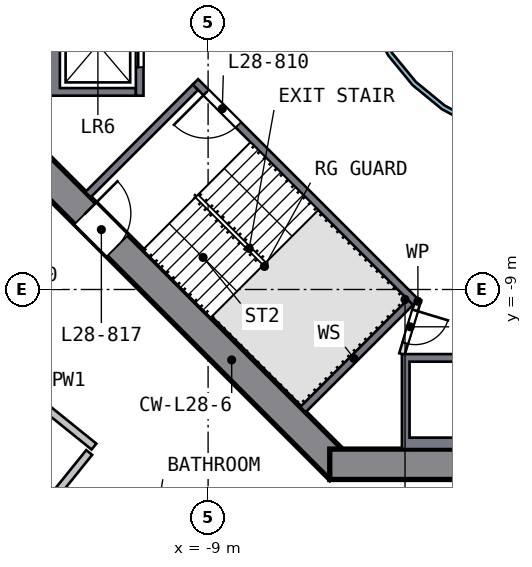
"""IFC4 building model, lengths in metres.
Left out: names, types, materials, properties, quantities, classifications, styles, units other than length and angle.
Written with IfcOpenShell. Run it as: python <this file> out.ifc"""

import sys

from ifc_helpers import new_model, si_unit, direction, frame, frame_2d, origin, place, context, subcontext, project, spatial, polyline, rectangle, outline, extrude, element, fill, save


model = new_model("IFC4")
c1 = context("Model", 3, precision=1e-05, world=origin(), true_north=direction((0.0, 1.0)))
c2 = subcontext(c1, "Body", "Model", "MODEL_VIEW")
j1 = project(units=[si_unit("LENGTHUNIT", "METRE"), si_unit("PLANEANGLEUNIT", "RADIAN")], contexts=[c1])
p1 = place(None, origin())
s1 = spatial("IfcSite", under=j1, at=p1, CompositionType="ELEMENT")
p2 = place(p1, origin())
s2 = spatial("IfcBuilding", under=s1, at=p2, CompositionType="ELEMENT")
p3 = place(p2, frame((0.0, 0.0, 118.5)))
s3 = spatial("IfcBuildingStorey", under=s2, at=p3, CompositionType="ELEMENT", Elevation=118.5)
p4 = place(p3, frame((-13.717, -5.516, 0.0), z_axis=(0.0, 0.0, 1.0), x_axis=(0.707106781, -0.707106781, 0.0)))
e1 = element("IfcWall", 1, at=p4, inside=s3, PredefinedType="SHEAR", context=c2, shape_type="SweptSolid", body=[
    extrude(rectangle(XDim=11.598, YDim=0.8, at=frame_2d((5.799, 0.0))), origin(), (0.0, 0.0, 1.0), 3.5),
])
p5 = place(p4, frame((2.099, 0.0, 0.0)))
e2 = element("IfcOpeningElement", 2, at=p5, cuts=e1, PredefinedType="OPENING", context=c2, shape_type="SweptSolid", body=[
    extrude(rectangle(XDim=1.2, YDim=2.1, at=frame_2d((0.6, 1.05))), frame((0.0, 0.41, 0.0), z_axis=(0.0, -1.0, 0.0), x_axis=(1.0, 0.0, 0.0)), (0.0, 0.0, 1.0), 0.82),
])
p6 = place(p3, frame((-5.799, -13.6, 0.0), z_axis=(0.0, 0.0, 1.0), x_axis=(1.0, 0.0, 0.0)))
e3 = element("IfcWall", 3, at=p6, inside=s3, PredefinedType="SHEAR", context=c2, shape_type="SweptSolid", body=[
    extrude(rectangle(XDim=11.598, YDim=0.8, at=frame_2d((5.799, 0.0))), origin(), (0.0, 0.0, 1.0), 3.5),
])
p7 = place(p6, frame((4.899, 0.0, 0.0)))
e4 = element("IfcOpeningElement", 4, at=p7, cuts=e3, PredefinedType="OPENING", context=c2, shape_type="SweptSolid", body=[
    extrude(rectangle(XDim=1.8, YDim=2.1, at=frame_2d((0.9, 1.05))), frame((0.0, 0.41, 0.0), z_axis=(0.0, -1.0, 0.0), x_axis=(1.0, 0.0, 0.0)), (0.0, 0.0, 1.0), 0.82),
])
p8 = place(p3, origin())
e5 = element("IfcWall", 5, at=p8, inside=s3, PredefinedType="SOLIDWALL", context=c2, shape_type="SweptSolid", body=[
    extrude(outline(polyline([(-13.2, -3.9), (-13.2, -1.2), (-10.9, -1.2), (-10.9, -1.4), (-12.9, -1.4), (-12.9, -3.7), (-10.9, -3.7), (-10.9, -3.9), (-13.2, -3.9)])), origin(), (0.0, 0.0, 1.0), 3.0),
])
p9 = place(p3, frame((-10.8, -1.2, 0.0), z_axis=(0.0, 0.0, 1.0), x_axis=(0.0, -1.0, 0.0)))
e6 = element("IfcWall", 6, at=p9, inside=s3, PredefinedType="SOLIDWALL", context=c2, shape_type="SweptSolid", body=[
    extrude(rectangle(XDim=2.7, YDim=0.2, at=frame_2d((1.35, 0.0))), origin(), (0.0, 0.0, 1.0), 3.0),
])
p10 = place(p9, frame((0.75, 0.0, 0.0)))
e7 = element("IfcOpeningElement", 7, at=p10, cuts=e6, PredefinedType="OPENING", context=c2, shape_type="SweptSolid", body=[
    extrude(rectangle(XDim=1.2, YDim=2.1, at=frame_2d((0.6, 1.05))), frame((0.0, 0.11, 0.0), z_axis=(0.0, -1.0, 0.0), x_axis=(1.0, 0.0, 0.0)), (0.0, 0.0, 1.0), 0.22),
])
p11 = place(p3, origin())
e8 = element("IfcWall", 8, at=p11, inside=s3, PredefinedType="SOLIDWALL", context=c2, shape_type="SweptSolid", body=[
    extrude(outline(polyline([(-1.2, -13.2), (-3.9, -13.2), (-3.9, -10.7), (-1.2, -10.7), (-1.2, -13.2)]), holes=[polyline([(-3.7, -10.9), (-3.7, -12.9), (-1.4, -12.9), (-1.4, -10.9), (-3.7, -10.9)])]), origin(), (0.0, 0.0, 1.0), 3.0),
])
p12 = place(p3, frame((-3.535, -9.334, 0.0), z_axis=(0.0, 0.0, 1.0), x_axis=(-0.707106781, 0.707106781, 0.0)))
e9 = element("IfcWall", 9, at=p12, inside=s3, PredefinedType="SOLIDWALL", context=c2, shape_type="SweptSolid", body=[
    extrude(rectangle(XDim=8.2, YDim=0.2, at=frame_2d((4.1, 0.0))), origin(), (0.0, 0.0, 1.0), 3.0),
])
p13 = place(p12, frame((6.6, 0.0, 0.0)))
e10 = element("IfcOpeningElement", 10, at=p13, cuts=e9, PredefinedType="OPENING", context=c2, shape_type="SweptSolid", body=[
    extrude(rectangle(XDim=1.2, YDim=2.1, at=frame_2d((0.6, 1.05))), frame((0.0, 0.11, 0.0), z_axis=(0.0, -1.0, 0.0), x_axis=(1.0, 0.0, 0.0)), (0.0, 0.0, 1.0), 0.22),
])
for number, where, z_axis, x_axis in (
    (11, (-9.334, -3.677, 0.0), (0.0, 0.0, 1.0), (-0.707, -0.707, 0.0)),
    (12, (-3.677, -9.334, 0.0), (0.0, 0.0, 1.0), (-0.707, -0.707, 0.0)),
):
    element("IfcWall", number, at=place(p3, frame(where, z_axis=z_axis, x_axis=x_axis)), inside=s3, PredefinedType="SOLIDWALL", context=c2, shape_type="SweptSolid", body=[
        extrude(rectangle(XDim=4.0, YDim=0.2, at=frame_2d((2.0, 0.0))), origin(), (0.0, 0.0, 1.0), 3.0),
    ])
p14 = place(p3, frame((-3.465, -9.263, 0.0), z_axis=(0.0, 0.0, 1.0), x_axis=(-0.289808785, -0.957084567, 0.0)))
e13 = element("IfcWall", 13, at=p14, inside=s3, PredefinedType="PARTITIONING", context=c2, shape_type="SweptSolid", body=[
    extrude(rectangle(XDim=1.501, YDim=0.15, at=frame_2d((0.75, 0.0))), origin(), (0.0, 0.0, 1.0), 3.0),
])
p15 = place(p14, frame((0.301, 0.0, 0.0)))
e14 = element("IfcOpeningElement", 14, at=p15, cuts=e13, PredefinedType="OPENING", context=c2, shape_type="SweptSolid", body=[
    extrude(rectangle(XDim=0.9, YDim=2.1, at=frame_2d((0.45, 1.05))), frame((0.0, 0.085, 0.0), z_axis=(0.0, -1.0, 0.0), x_axis=(1.0, 0.0, 0.0)), (0.0, 0.0, 1.0), 0.17),
])
p16 = place(p3, origin())
e15 = element("IfcWall", 15, at=p16, inside=s3, PredefinedType="SOLIDWALL", context=c2, shape_type="SweptSolid", body=[
    extrude(outline(polyline([(5.021, -0.999), (4.73, -1.959), (4.257, -2.844), (3.62, -3.62), (2.844, -4.257), (1.959, -4.73), (0.999, -5.021), (0.0, -5.12), (-0.999, -5.021), (-1.959, -4.73), (-2.844, -4.257), (-3.62, -3.62), (-4.257, -2.844), (-4.73, -1.959), (-5.021, -0.999), (-5.12, 0.0), (-5.021, 0.999), (-4.73, 1.959), (-4.257, 2.844), (-3.62, 3.62), (-2.844, 4.257), (-1.959, 4.73), (-0.999, 5.021), (0.0, 5.12), (0.999, 5.021), (1.959, 4.73), (2.844, 4.257), (3.62, 3.62), (4.257, 2.844), (4.73, 1.959), (5.021, 0.999), (5.12, 0.0), (5.021, -0.999)]), holes=[polyline([(4.904, 0.976), (4.619, 1.913), (4.157, 2.778), (3.535, 3.535), (2.778, 4.157), (1.913, 4.619), (0.976, 4.904), (0.0, 5.0), (-0.976, 4.904), (-1.913, 4.619), (-2.778, 4.157), (-3.535, 3.535), (-4.157, 2.778), (-4.619, 1.913), (-4.904, 0.976), (-5.0, 0.0), (-4.904, -0.976), (-4.619, -1.913), (-4.157, -2.778), (-3.535, -3.535), (-2.778, -4.157), (-1.913, -4.619), (-0.976, -4.904), (0.0, -5.0), (0.976, -4.904), (1.913, -4.619), (2.778, -4.157), (3.535, -3.535), (4.157, -2.778), (4.619, -1.913), (4.904, -0.976), (5.0, 0.0), (4.904, 0.976)])]), origin(), (0.0, 0.0, 1.0), 3.0),
])
p17 = place(p3, frame((-21.367, -24.747, 0.0), z_axis=(0.0, 0.0, 1.0), x_axis=(0.627686308, 0.778466376, 0.0)))
e16 = element("IfcWall", 16, at=p17, inside=s3, PredefinedType="SOLIDWALL", context=c2, shape_type="SweptSolid", body=[
    extrude(rectangle(XDim=14.718, YDim=0.2, at=frame_2d((7.359, 0.0))), origin(), (0.0, 0.0, 1.0), 3.0),
])
p18 = place(p17, frame((6.85, 0.0, 0.0)))
e17 = element("IfcOpeningElement", 17, at=p18, cuts=e16, PredefinedType="OPENING", context=c2, shape_type="SweptSolid", body=[
    extrude(rectangle(XDim=1.0, YDim=2.1, at=frame_2d((0.5, 1.05))), frame((0.0, 0.11, 0.0), z_axis=(0.0, -1.0, 0.0), x_axis=(1.0, 0.0, 0.0)), (0.0, 0.0, 1.0), 0.22),
])
p19 = place(p3, frame((-14.65, -11.0, 0.0), z_axis=(0.0, 0.0, 1.0), x_axis=(0.778439072, -0.62772017, 0.0)))
e18 = element("IfcWall", 18, at=p19, inside=s3, PredefinedType="SOLIDWALL", context=c2, shape_type="SweptSolid", body=[
    extrude(rectangle(XDim=3.4, YDim=0.2, at=frame_2d((1.7, 0.0))), origin(), (0.0, 0.0, 1.0), 3.0),
])
p20 = place(p10, origin())
e19 = element("IfcDoor", 19, at=p20, inside=s3, OperationType="DOUBLE_DOOR_SLIDING", PredefinedType="DOOR", context=c2, shape_type="SweptSolid", body=[
    extrude(rectangle(XDim=1.2, YDim=2.1, at=frame_2d((0.6, 1.05))), frame((0.0, 0.025, 0.0), z_axis=(0.0, -1.0, 0.0), x_axis=(1.0, 0.0, 0.0)), (0.0, 0.0, 1.0), 0.05),
])
fill(e7, e19)
p21 = place(p13, origin())
e20 = element("IfcDoor", 20, at=p21, inside=s3, OperationType="SINGLE_SWING_RIGHT", PredefinedType="DOOR", context=c2, shape_type="SweptSolid", body=[
    extrude(rectangle(XDim=1.2, YDim=2.1, at=frame_2d((0.6, 1.05))), frame((0.0, 0.025, 0.0), z_axis=(0.0, -1.0, 0.0), x_axis=(1.0, 0.0, 0.0)), (0.0, 0.0, 1.0), 0.05),
])
fill(e10, e20)
p22 = place(p5, origin())
e21 = element("IfcDoor", 21, at=p22, inside=s3, OperationType="SINGLE_SWING_LEFT", PredefinedType="DOOR", context=c2, shape_type="SweptSolid", body=[
    extrude(rectangle(XDim=1.2, YDim=2.1, at=frame_2d((0.6, 1.05))), frame((0.0, 0.025, 0.0), z_axis=(0.0, -1.0, 0.0), x_axis=(1.0, 0.0, 0.0)), (0.0, 0.0, 1.0), 0.05),
])
fill(e2, e21)
p23 = place(p15, origin())
e22 = element("IfcDoor", 22, at=p23, inside=s3, OperationType="SINGLE_SWING_LEFT", PredefinedType="DOOR", context=c2, shape_type="SweptSolid", body=[
    extrude(rectangle(XDim=0.9, YDim=2.1, at=frame_2d((0.45, 1.05))), frame((0.0, 0.025, 0.0), z_axis=(0.0, -1.0, 0.0), x_axis=(1.0, 0.0, 0.0)), (0.0, 0.0, 1.0), 0.05),
])
fill(e14, e22)
save(model, sys.argv[1])
